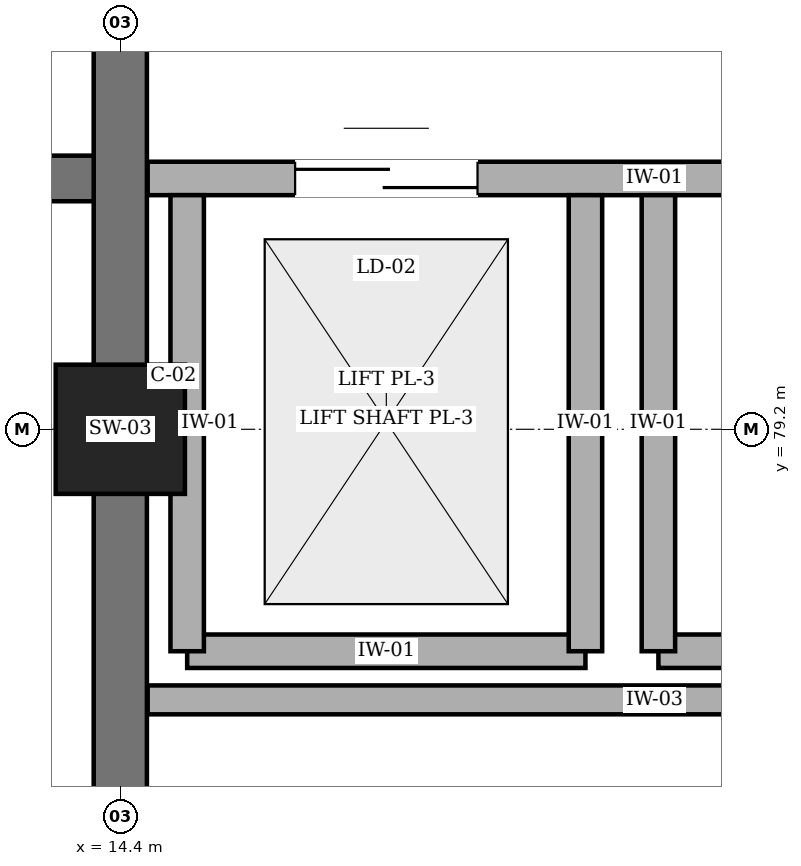
"""IFC4 building model, lengths in metres.
Left out: names, types, materials, properties, quantities, classifications, styles, units other than length and angle.
Written with IfcOpenShell. Run it as: python <this file> out.ifc"""

import sys

from ifc_helpers import new_model, si_unit, direction, frame, frame_2d, origin, origin_2d, place, context, subcontext, project, spatial, rectangle, extrude, element, fill, save


model = new_model("IFC4")
c1 = context("Model", 3, precision=1e-05, world=origin(), true_north=direction((0.0, 1.0)))
c2 = subcontext(c1, "Body", "Model", "MODEL_VIEW")
j1 = project(units=[si_unit("LENGTHUNIT", "METRE"), si_unit("PLANEANGLEUNIT", "RADIAN")], contexts=[c1])
p1 = place(None, origin())
s1 = spatial("IfcSite", under=j1, at=p1, CompositionType="ELEMENT")
p2 = place(p1, origin())
s2 = spatial("IfcBuilding", under=s1, at=p2, CompositionType="ELEMENT")
p3 = place(p2, frame((0.0, 0.0, -5.4)))
s3 = spatial("IfcBuildingStorey", under=s2, at=p3, CompositionType="ELEMENT", Elevation=-5.4)
p4 = place(p3, frame((14.4, 86.05, 0.0), z_axis=(0.0, 0.0, 1.0), x_axis=(0.0, -1.0, 0.0)))
e1 = element("IfcWall", 1, at=p4, inside=s3, PredefinedType="SHEAR", context=c2, shape_type="SweptSolid", body=[
    extrude(rectangle(XDim=13.7, YDim=0.35, at=frame_2d((6.85, 0.0))), origin(), (0.0, 0.0, 1.0), 5.4),
])
p5 = place(p4, frame((1.5, 0.0, 0.0)))
e2 = element("IfcOpeningElement", 2, at=p5, cuts=e1, PredefinedType="OPENING", context=c2, shape_type="SweptSolid", body=[
    extrude(rectangle(XDim=1.25, YDim=2.2, at=frame_2d((0.625, 1.1))), frame((0.0, 0.185, 0.0), z_axis=(0.0, -1.0, 0.0), x_axis=(1.0, 0.0, 0.0)), (0.0, 0.0, 1.0), 0.37),
])
p6 = place(p3, frame((7.55, 80.85, 0.0), z_axis=(0.0, 0.0, 1.0), x_axis=(1.0, 0.0, 0.0)))
e3 = element("IfcWall", 3, at=p6, inside=s3, PredefinedType="SHEAR", context=c2, shape_type="SweptSolid", body=[
    extrude(rectangle(XDim=6.675, YDim=0.3, at=frame_2d((3.337, 0.0))), origin(), (0.0, 0.0, 1.0), 5.4),
])
p7 = place(p6, frame((2.812, 0.0, 0.0)))
e4 = element("IfcOpeningElement", 4, at=p7, cuts=e3, PredefinedType="OPENING", context=c2, shape_type="SweptSolid", body=[
    extrude(rectangle(XDim=1.4, YDim=2.2, at=frame_2d((0.7, 1.1))), frame((0.0, 0.16, 0.0), z_axis=(0.0, -1.0, 0.0), x_axis=(1.0, 0.0, 0.0)), (0.0, 0.0, 1.0), 0.32),
])
p8 = place(p3, frame((14.4, 79.2, 0.0), z_axis=(0.0, 0.0, 1.0), x_axis=(1.0, 0.0, 0.0)))
e5 = element("IfcColumn", 5, at=p8, inside=s3, PredefinedType="COLUMN", context=c2, shape_type="SweptSolid", body=[
    extrude(rectangle(XDim=0.85, YDim=0.85, at=origin_2d()), origin(), (0.0, 0.0, 1.0), 5.0),
])
p9 = place(p3, frame((14.58, 77.42, 0.0), z_axis=(0.0, 0.0, 1.0), x_axis=(1.0, 0.0, 0.0)))
e6 = element("IfcWall", 6, at=p9, inside=s3, PredefinedType="PARTITIONING", context=c2, shape_type="SweptSolid", body=[
    extrude(rectangle(XDim=6.67, YDim=0.19, at=frame_2d((3.335, 0.0))), origin(), (0.0, 0.0, 1.0), 5.05),
])
p10 = place(p3, frame((14.58, 80.85, 0.0), z_axis=(0.0, 0.0, 1.0), x_axis=(1.0, 0.0, 0.0)))
e7 = element("IfcWall", 7, at=p10, inside=s3, PredefinedType="PARTITIONING", context=c2, shape_type="SweptSolid", body=[
    extrude(rectangle(XDim=6.67, YDim=0.22, at=frame_2d((3.335, 0.0))), origin(), (0.0, 0.0, 1.0), 5.05),
])
p11 = place(p10, frame((0.97, 0.0, 0.0)))
e8 = element("IfcOpeningElement", 8, at=p11, cuts=e7, PredefinedType="OPENING", context=c2, shape_type="SweptSolid", body=[
    extrude(rectangle(XDim=1.2, YDim=2.15, at=frame_2d((0.6, 1.075))), frame((0.0, 0.12, 0.0), z_axis=(0.0, -1.0, 0.0), x_axis=(1.0, 0.0, 0.0)), (0.0, 0.0, 1.0), 0.24),
])
p12 = place(p10, frame((4.02, 0.0, 0.0)))
e9 = element("IfcOpeningElement", 9, at=p12, cuts=e7, PredefinedType="OPENING", context=c2, shape_type="SweptSolid", body=[
    extrude(rectangle(XDim=1.5, YDim=2.25, at=frame_2d((0.75, 1.125))), frame((0.0, 0.12, 0.0), z_axis=(0.0, -1.0, 0.0), x_axis=(1.0, 0.0, 0.0)), (0.0, 0.0, 1.0), 0.24),
])
p13 = place(p3, frame((14.84, 77.74, 0.0), z_axis=(0.0, 0.0, 1.0), x_axis=(1.0, 0.0, 0.0)))
e10 = element("IfcWall", 10, at=p13, inside=s3, PredefinedType="PARTITIONING", context=c2, shape_type="SweptSolid", body=[
    extrude(rectangle(XDim=2.62, YDim=0.22, at=frame_2d((1.31, 0.0))), origin(), (0.0, 0.0, 1.0), 5.05),
])
for number, where, z_axis, x_axis in (
    (11, (14.84, 77.74, 0.0), (0.0, 0.0, 1.0), (0.0, 1.0, 0.0)),
    (12, (17.46, 77.74, 0.0), (0.0, 0.0, 1.0), (0.0, 1.0, 0.0)),
):
    element("IfcWall", number, at=place(p3, frame(where, z_axis=z_axis, x_axis=x_axis)), inside=s3, PredefinedType="PARTITIONING", context=c2, shape_type="SweptSolid", body=[
        extrude(rectangle(XDim=3.0, YDim=0.22, at=frame_2d((1.5, 0.0))), origin(), (0.0, 0.0, 1.0), 5.05),
    ])
p14 = place(p3, frame((17.94, 77.74, 0.0), z_axis=(0.0, 0.0, 1.0), x_axis=(1.0, 0.0, 0.0)))
e13 = element("IfcWall", 13, at=p14, inside=s3, PredefinedType="PARTITIONING", context=c2, shape_type="SweptSolid", body=[
    extrude(rectangle(XDim=2.82, YDim=0.22, at=frame_2d((1.41, 0.0))), origin(), (0.0, 0.0, 1.0), 5.05),
])
p15 = place(p3, frame((17.94, 77.74, 0.0), z_axis=(0.0, 0.0, 1.0), x_axis=(0.0, 1.0, 0.0)))
e14 = element("IfcWall", 14, at=p15, inside=s3, PredefinedType="PARTITIONING", context=c2, shape_type="SweptSolid", body=[
    extrude(rectangle(XDim=3.0, YDim=0.22, at=frame_2d((1.5, 0.0))), origin(), (0.0, 0.0, 1.0), 5.05),
])
p16 = place(p11, origin())
e15 = element("IfcDoor", 15, at=p16, inside=s3, OperationType="DOUBLE_DOOR_SLIDING", PredefinedType="DOOR", context=c2, shape_type="SweptSolid", body=[
    extrude(rectangle(XDim=1.2, YDim=2.15, at=frame_2d((0.6, 1.075))), frame((0.0, 0.025, 0.0), z_axis=(0.0, -1.0, 0.0), x_axis=(1.0, 0.0, 0.0)), (0.0, 0.0, 1.0), 0.05),
])
fill(e8, e15)
save(model, sys.argv[1])
